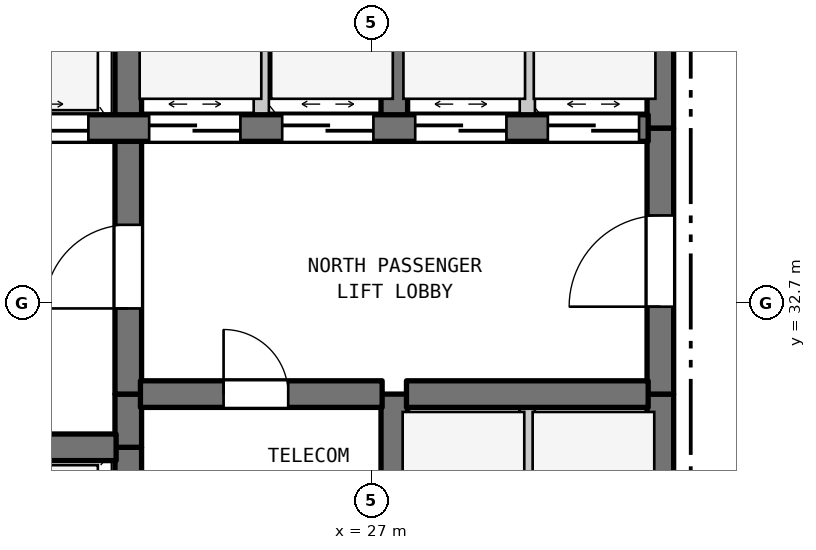
"""IFC4 building model, lengths in metres.
Left out: names, types, materials, properties, quantities, classifications, styles, units other than length and angle.
Written with IfcOpenShell. Run it as: python <this file> out.ifc"""

import sys

from ifc_helpers import new_model, si_unit, direction, frame, frame_2d, origin, place, context, subcontext, project, spatial, rectangle, extrude, element, fill, save


model = new_model("IFC4")
c1 = context("Model", 3, precision=1e-05, world=origin(), true_north=direction((0.0, 1.0)))
c2 = subcontext(c1, "Body", "Model", "MODEL_VIEW")
j1 = project(units=[si_unit("LENGTHUNIT", "METRE"), si_unit("PLANEANGLEUNIT", "RADIAN")], contexts=[c1])
p1 = place(None, origin())
s1 = spatial("IfcSite", under=j1, at=p1, CompositionType="ELEMENT")
p2 = place(p1, origin())
s2 = spatial("IfcBuilding", under=s1, at=p2, CompositionType="ELEMENT")
p3 = place(p2, frame((0.0, 0.0, 70.1)))
s3 = spatial("IfcBuildingStorey", under=s2, at=p3, CompositionType="ELEMENT", Elevation=70.1)
p4 = place(p3, frame((23.8, 29.5, 0.0), z_axis=(0.0, 0.0, 1.0), x_axis=(0.0, 1.0, 0.0)))
e1 = element("IfcWall", 1, at=p4, inside=s3, PredefinedType="SHEAR", context=c2, shape_type="SweptSolid", body=[
    extrude(rectangle(XDim=1.3, YDim=0.35, at=frame_2d((0.65, 0.0))), origin(), (0.0, 0.0, 1.0), 3.385),
])
p5 = place(p3, frame((23.8, 30.8, 0.0), z_axis=(0.0, 0.0, 1.0), x_axis=(0.0, 1.0, 0.0)))
e2 = element("IfcWall", 2, at=p5, inside=s3, PredefinedType="SHEAR", context=c2, shape_type="SweptSolid", body=[
    extrude(rectangle(XDim=0.7, YDim=0.35, at=frame_2d((0.35, 0.0))), origin(), (0.0, 0.0, 1.0), 3.385),
])
p6 = place(p3, frame((23.8, 31.5, 0.0), z_axis=(0.0, 0.0, 1.0), x_axis=(0.0, 1.0, 0.0)))
e3 = element("IfcWall", 3, at=p6, inside=s3, PredefinedType="SHEAR", context=c2, shape_type="SweptSolid", body=[
    extrude(rectangle(XDim=3.5, YDim=0.35, at=frame_2d((1.75, 0.0))), origin(), (0.0, 0.0, 1.0), 3.385),
])
p7 = place(p6, frame((1.127, 0.0, 0.0)))
e4 = element("IfcOpeningElement", 4, at=p7, cuts=e3, PredefinedType="OPENING", context=c2, shape_type="SweptSolid", body=[
    extrude(rectangle(XDim=1.1, YDim=2.15, at=frame_2d((0.55, 1.075))), frame((0.0, 0.185, 0.0), z_axis=(0.0, -1.0, 0.0), x_axis=(1.0, 0.0, 0.0)), (0.0, 0.0, 1.0), 0.37),
])
p8 = place(p3, frame((23.8, 35.0, 0.0), z_axis=(0.0, 0.0, 1.0), x_axis=(0.0, 1.0, 0.0)))
e5 = element("IfcWall", 5, at=p8, inside=s3, PredefinedType="SHEAR", context=c2, shape_type="SweptSolid", body=[
    extrude(rectangle(XDim=2.9, YDim=0.35, at=frame_2d((1.45, 0.0))), origin(), (0.0, 0.0, 1.0), 3.385),
])
p9 = place(p3, frame((25.55, 35.0, 0.0), z_axis=(0.0, 0.0, 1.0), x_axis=(0.0, 1.0, 0.0)))
e6 = element("IfcWall", 6, at=p9, inside=s3, PredefinedType="STANDARD", context=c2, shape_type="SweptSolid", body=[
    extrude(rectangle(XDim=2.9, YDim=0.2, at=frame_2d((1.45, 0.0))), origin(), (0.0, 0.0, 1.0), 3.385),
])
p10 = place(p3, frame((27.3, 29.5, 0.0), z_axis=(0.0, 0.0, 1.0), x_axis=(0.0, 1.0, 0.0)))
e7 = element("IfcWall", 7, at=p10, inside=s3, PredefinedType="SHEAR", context=c2, shape_type="SweptSolid", body=[
    extrude(rectangle(XDim=2.0, YDim=0.35, at=frame_2d((1.0, 0.0))), origin(), (0.0, 0.0, 1.0), 3.385),
])
p11 = place(p3, frame((27.3, 35.0, 0.0), z_axis=(0.0, 0.0, 1.0), x_axis=(0.0, 1.0, 0.0)))
e8 = element("IfcWall", 8, at=p11, inside=s3, PredefinedType="SHEAR", context=c2, shape_type="SweptSolid", body=[
    extrude(rectangle(XDim=2.9, YDim=0.35, at=frame_2d((1.45, 0.0))), origin(), (0.0, 0.0, 1.0), 3.385),
])
p12 = place(p3, frame((29.05, 28.9, 0.0), z_axis=(0.0, 0.0, 1.0), x_axis=(0.0, 1.0, 0.0)))
e9 = element("IfcWall", 9, at=p12, inside=s3, PredefinedType="STANDARD", context=c2, shape_type="SweptSolid", body=[
    extrude(rectangle(XDim=2.6, YDim=0.2, at=frame_2d((1.3, 0.0))), origin(), (0.0, 0.0, 1.0), 3.385),
])
p13 = place(p3, frame((29.05, 35.0, 0.0), z_axis=(0.0, 0.0, 1.0), x_axis=(0.0, 1.0, 0.0)))
e10 = element("IfcWall", 10, at=p13, inside=s3, PredefinedType="STANDARD", context=c2, shape_type="SweptSolid", body=[
    extrude(rectangle(XDim=2.9, YDim=0.2, at=frame_2d((1.45, 0.0))), origin(), (0.0, 0.0, 1.0), 3.385),
])
p14 = place(p3, frame((30.8, 28.9, 0.0), z_axis=(0.0, 0.0, 1.0), x_axis=(0.0, 1.0, 0.0)))
e11 = element("IfcWall", 11, at=p14, inside=s3, PredefinedType="SHEAR", context=c2, shape_type="SweptSolid", body=[
    extrude(rectangle(XDim=2.6, YDim=0.35, at=frame_2d((1.3, 0.0))), origin(), (0.0, 0.0, 1.0), 3.385),
])
p15 = place(p3, frame((30.8, 31.5, 0.0), z_axis=(0.0, 0.0, 1.0), x_axis=(0.0, 1.0, 0.0)))
e12 = element("IfcWall", 12, at=p15, inside=s3, PredefinedType="SHEAR", context=c2, shape_type="SweptSolid", body=[
    extrude(rectangle(XDim=3.5, YDim=0.35, at=frame_2d((1.75, 0.0))), origin(), (0.0, 0.0, 1.0), 3.385),
])
p16 = place(p15, frame((1.15, 0.0, 0.0)))
e13 = element("IfcOpeningElement", 13, at=p16, cuts=e12, PredefinedType="OPENING", context=c2, shape_type="SweptSolid", body=[
    extrude(rectangle(XDim=1.2, YDim=2.2, at=frame_2d((0.6, 1.1))), frame((0.0, 0.185, 0.0), z_axis=(0.0, -1.0, 0.0), x_axis=(1.0, 0.0, 0.0)), (0.0, 0.0, 1.0), 0.37),
])
p17 = place(p3, frame((30.8, 35.0, 0.0), z_axis=(0.0, 0.0, 1.0), x_axis=(0.0, 1.0, 0.0)))
e14 = element("IfcWall", 14, at=p17, inside=s3, PredefinedType="SHEAR", context=c2, shape_type="SweptSolid", body=[
    extrude(rectangle(XDim=2.9, YDim=0.35, at=frame_2d((1.45, 0.0))), origin(), (0.0, 0.0, 1.0), 3.385),
])
p18 = place(p3, frame((19.16, 30.8, 0.0), z_axis=(0.0, 0.0, 1.0), x_axis=(1.0, 0.0, 0.0)))
e15 = element("IfcWall", 15, at=p18, inside=s3, PredefinedType="SHEAR", context=c2, shape_type="SweptSolid", body=[
    extrude(rectangle(XDim=4.48, YDim=0.35, at=frame_2d((2.24, 0.0))), origin(), (0.0, 0.0, 1.0), 3.385),
])
p19 = place(p3, frame((23.96, 31.5, 0.0), z_axis=(0.0, 0.0, 1.0), x_axis=(1.0, 0.0, 0.0)))
e16 = element("IfcWall", 16, at=p19, inside=s3, PredefinedType="SHEAR", context=c2, shape_type="SweptSolid", body=[
    extrude(rectangle(XDim=3.18, YDim=0.35, at=frame_2d((1.59, 0.0))), origin(), (0.0, 0.0, 1.0), 3.385),
])
p20 = place(p19, frame((1.094, 0.0, 0.0)))
e17 = element("IfcOpeningElement", 17, at=p20, cuts=e16, PredefinedType="OPENING", context=c2, shape_type="SweptSolid", body=[
    extrude(rectangle(XDim=0.85, YDim=2.1, at=frame_2d((0.425, 1.05))), frame((0.0, 0.185, 0.0), z_axis=(0.0, -1.0, 0.0), x_axis=(1.0, 0.0, 0.0)), (0.0, 0.0, 1.0), 0.37),
])
p21 = place(p3, frame((27.46, 31.5, 0.0), z_axis=(0.0, 0.0, 1.0), x_axis=(1.0, 0.0, 0.0)))
e18 = element("IfcWall", 18, at=p21, inside=s3, PredefinedType="SHEAR", context=c2, shape_type="SweptSolid", body=[
    extrude(rectangle(XDim=3.18, YDim=0.35, at=frame_2d((1.59, 0.0))), origin(), (0.0, 0.0, 1.0), 3.385),
])
p22 = place(p3, frame((19.16, 35.0, 0.0), z_axis=(0.0, 0.0, 1.0), x_axis=(1.0, 0.0, 0.0)))
e19 = element("IfcWall", 19, at=p22, inside=s3, PredefinedType="SHEAR", context=c2, shape_type="SweptSolid", body=[
    extrude(rectangle(XDim=11.48, YDim=0.35, at=frame_2d((5.74, 0.0))), origin(), (0.0, 0.0, 1.0), 3.385),
])
p23 = place(p22, frame((0.365, 0.0, 0.0)))
e20 = element("IfcOpeningElement", 20, at=p23, cuts=e19, PredefinedType="OPENING", context=c2, shape_type="SweptSolid", body=[
    extrude(rectangle(XDim=1.35, YDim=2.2, at=frame_2d((0.675, 1.1))), frame((0.0, 0.185, 0.0), z_axis=(0.0, -1.0, 0.0), x_axis=(1.0, 0.0, 0.0)), (0.0, 0.0, 1.0), 0.37),
])
p24 = place(p22, frame((2.765, 0.0, 0.0)))
e21 = element("IfcOpeningElement", 21, at=p24, cuts=e19, PredefinedType="OPENING", context=c2, shape_type="SweptSolid", body=[
    extrude(rectangle(XDim=1.35, YDim=2.2, at=frame_2d((0.675, 1.1))), frame((0.0, 0.185, 0.0), z_axis=(0.0, -1.0, 0.0), x_axis=(1.0, 0.0, 0.0)), (0.0, 0.0, 1.0), 0.37),
])
p25 = place(p22, frame((4.915, 0.0, 0.0)))
e22 = element("IfcOpeningElement", 22, at=p25, cuts=e19, PredefinedType="OPENING", context=c2, shape_type="SweptSolid", body=[
    extrude(rectangle(XDim=1.2, YDim=2.2, at=frame_2d((0.6, 1.1))), frame((0.0, 0.185, 0.0), z_axis=(0.0, -1.0, 0.0), x_axis=(1.0, 0.0, 0.0)), (0.0, 0.0, 1.0), 0.37),
])
p26 = place(p22, frame((6.665, 0.0, 0.0)))
e23 = element("IfcOpeningElement", 23, at=p26, cuts=e19, PredefinedType="OPENING", context=c2, shape_type="SweptSolid", body=[
    extrude(rectangle(XDim=1.2, YDim=2.2, at=frame_2d((0.6, 1.1))), frame((0.0, 0.185, 0.0), z_axis=(0.0, -1.0, 0.0), x_axis=(1.0, 0.0, 0.0)), (0.0, 0.0, 1.0), 0.37),
])
p27 = place(p22, frame((8.415, 0.0, 0.0)))
e24 = element("IfcOpeningElement", 24, at=p27, cuts=e19, PredefinedType="OPENING", context=c2, shape_type="SweptSolid", body=[
    extrude(rectangle(XDim=1.2, YDim=2.2, at=frame_2d((0.6, 1.1))), frame((0.0, 0.185, 0.0), z_axis=(0.0, -1.0, 0.0), x_axis=(1.0, 0.0, 0.0)), (0.0, 0.0, 1.0), 0.37),
])
p28 = place(p22, frame((10.16, 0.0, 0.0)))
e25 = element("IfcOpeningElement", 25, at=p28, cuts=e19, PredefinedType="OPENING", context=c2, shape_type="SweptSolid", body=[
    extrude(rectangle(XDim=1.2, YDim=2.2, at=frame_2d((0.6, 1.1))), frame((0.0, 0.185, 0.0), z_axis=(0.0, -1.0, 0.0), x_axis=(1.0, 0.0, 0.0)), (0.0, 0.0, 1.0), 0.37),
])
p29 = place(p7, origin())
e26 = element("IfcDoor", 26, at=p29, inside=s3, OperationType="SINGLE_SWING_LEFT", PredefinedType="DOOR", context=c2, shape_type="SweptSolid", body=[
    extrude(rectangle(XDim=1.1, YDim=2.15, at=frame_2d((0.55, 1.075))), frame((0.0, 0.025, 0.0), z_axis=(0.0, -1.0, 0.0), x_axis=(1.0, 0.0, 0.0)), (0.0, 0.0, 1.0), 0.05),
])
fill(e4, e26)
p30 = place(p16, origin())
e27 = element("IfcDoor", 27, at=p30, inside=s3, OperationType="SINGLE_SWING_LEFT", PredefinedType="DOOR", context=c2, shape_type="SweptSolid", body=[
    extrude(rectangle(XDim=1.2, YDim=2.2, at=frame_2d((0.6, 1.1))), frame((0.0, 0.025, 0.0), z_axis=(0.0, -1.0, 0.0), x_axis=(1.0, 0.0, 0.0)), (0.0, 0.0, 1.0), 0.05),
])
fill(e13, e27)
p31 = place(p20, origin())
e28 = element("IfcDoor", 28, at=p31, inside=s3, OperationType="SINGLE_SWING_LEFT", PredefinedType="DOOR", context=c2, shape_type="SweptSolid", body=[
    extrude(rectangle(XDim=0.85, YDim=2.1, at=frame_2d((0.425, 1.05))), frame((0.0, 0.025, 0.0), z_axis=(0.0, -1.0, 0.0), x_axis=(1.0, 0.0, 0.0)), (0.0, 0.0, 1.0), 0.05),
])
fill(e17, e28)
p32 = place(p24, origin())
e29 = element("IfcDoor", 29, at=p32, inside=s3, OperationType="DOUBLE_DOOR_SLIDING", PredefinedType="DOOR", context=c2, shape_type="SweptSolid", body=[
    extrude(rectangle(XDim=1.35, YDim=2.2, at=frame_2d((0.675, 1.1))), frame((0.0, 0.025, 0.0), z_axis=(0.0, -1.0, 0.0), x_axis=(1.0, 0.0, 0.0)), (0.0, 0.0, 1.0), 0.05),
])
fill(e21, e29)
p33 = place(p25, origin())
e30 = element("IfcDoor", 30, at=p33, inside=s3, OperationType="DOUBLE_DOOR_SLIDING", PredefinedType="DOOR", context=c2, shape_type="SweptSolid", body=[
    extrude(rectangle(XDim=1.2, YDim=2.2, at=frame_2d((0.6, 1.1))), frame((0.0, 0.025, 0.0), z_axis=(0.0, -1.0, 0.0), x_axis=(1.0, 0.0, 0.0)), (0.0, 0.0, 1.0), 0.05),
])
fill(e22, e30)
p34 = place(p26, origin())
e31 = element("IfcDoor", 31, at=p34, inside=s3, OperationType="DOUBLE_DOOR_SLIDING", PredefinedType="DOOR", context=c2, shape_type="SweptSolid", body=[
    extrude(rectangle(XDim=1.2, YDim=2.2, at=frame_2d((0.6, 1.1))), frame((0.0, 0.025, 0.0), z_axis=(0.0, -1.0, 0.0), x_axis=(1.0, 0.0, 0.0)), (0.0, 0.0, 1.0), 0.05),
])
fill(e23, e31)
p35 = place(p27, origin())
e32 = element("IfcDoor", 32, at=p35, inside=s3, OperationType="DOUBLE_DOOR_SLIDING", PredefinedType="DOOR", context=c2, shape_type="SweptSolid", body=[
    extrude(rectangle(XDim=1.2, YDim=2.2, at=frame_2d((0.6, 1.1))), frame((0.0, 0.025, 0.0), z_axis=(0.0, -1.0, 0.0), x_axis=(1.0, 0.0, 0.0)), (0.0, 0.0, 1.0), 0.05),
])
fill(e24, e32)
p36 = place(p28, origin())
e33 = element("IfcDoor", 33, at=p36, inside=s3, OperationType="DOUBLE_DOOR_SLIDING", PredefinedType="DOOR", context=c2, shape_type="SweptSolid", body=[
    extrude(rectangle(XDim=1.2, YDim=2.2, at=frame_2d((0.6, 1.1))), frame((0.0, 0.025, 0.0), z_axis=(0.0, -1.0, 0.0), x_axis=(1.0, 0.0, 0.0)), (0.0, 0.0, 1.0), 0.05),
])
fill(e25, e33)
save(model, sys.argv[1])
